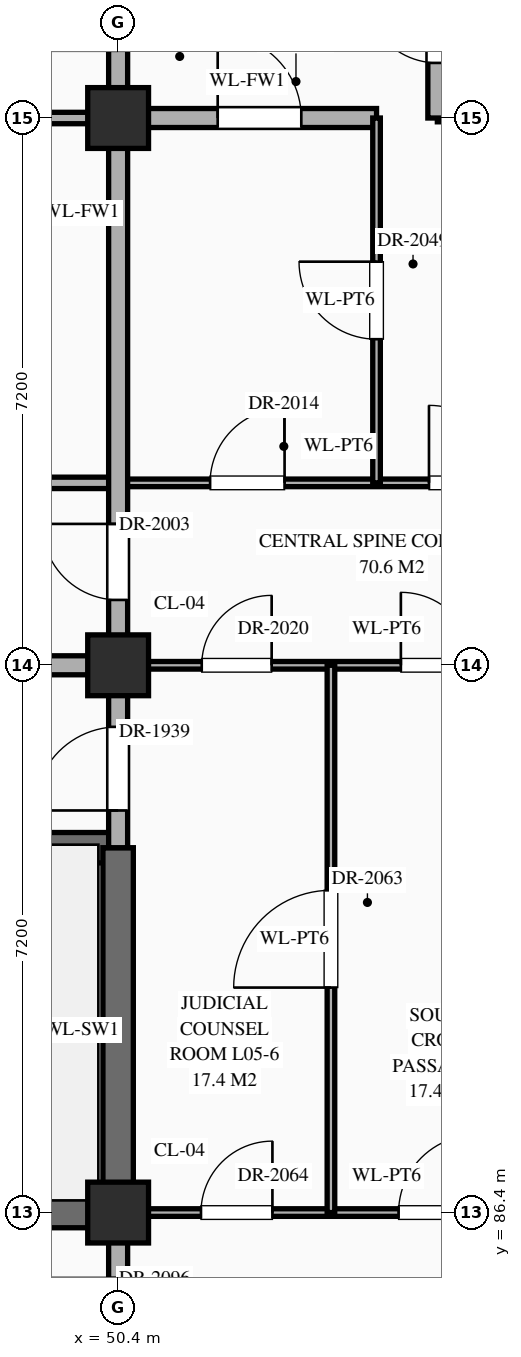
"""IFC4 building model, lengths in metres.
Left out: names, types, materials, properties, quantities, classifications, styles, units other than length and angle.
Written with IfcOpenShell. Run it as: python <this file> out.ifc"""

import sys

from ifc_helpers import new_model, si_unit, direction, frame, frame_2d, origin, origin_2d, place, context, subcontext, project, spatial, rectangle, extrude, element, fill, save


model = new_model("IFC4")
c1 = context("Model", 3, precision=1e-05, world=origin(), true_north=direction((0.0, 1.0)))
c2 = subcontext(c1, "Body", "Model", "MODEL_VIEW")
j1 = project(units=[si_unit("LENGTHUNIT", "METRE"), si_unit("PLANEANGLEUNIT", "RADIAN")], contexts=[c1])
p1 = place(None, origin())
s1 = spatial("IfcSite", under=j1, at=p1, CompositionType="ELEMENT")
p2 = place(p1, origin())
s2 = spatial("IfcBuilding", under=s1, at=p2, CompositionType="ELEMENT")
p3 = place(p2, frame((0.0, 0.0, 21.6)))
s3 = spatial("IfcBuildingStorey", under=s2, at=p3, CompositionType="ELEMENT", Elevation=21.6)
for number, where, z_axis, x_axis in (
    (1, (50.4, 86.4, 0.0), (0.0, 0.0, 1.0), (1.0, 0.0, 0.0)),
    (2, (50.4, 93.6, 0.0), (0.0, 0.0, 1.0), (1.0, 0.0, 0.0)),
    (3, (50.4, 100.8, 0.0), (0.0, 0.0, 1.0), (1.0, 0.0, 0.0)),
):
    element("IfcColumn", number, at=place(p3, frame(where, z_axis=z_axis, x_axis=x_axis)), inside=s3, PredefinedType="COLUMN", context=c2, shape_type="SweptSolid", body=[
        extrude(rectangle(XDim=0.8, YDim=0.8, at=origin_2d()), origin(), (0.0, 0.0, 1.0), 4.5),
    ])
p4 = place(p3, frame((42.0, 86.4, 0.0), z_axis=(0.0, 0.0, 1.0), x_axis=(1.0, 0.0, 0.0)))
e4 = element("IfcWall", 4, at=p4, inside=s3, PredefinedType="SHEAR", context=c2, shape_type="SweptSolid", body=[
    extrude(rectangle(XDim=8.4, YDim=0.4, at=frame_2d((4.2, 0.0))), origin(), (0.0, 0.0, 1.0), 4.24),
])
p5 = place(p3, frame((50.4, 86.4, 0.0), z_axis=(0.0, 0.0, 1.0), x_axis=(1.0, 0.0, 0.0)))
e5 = element("IfcWall", 5, at=p5, inside=s3, PredefinedType="STANDARD", context=c2, shape_type="SweptSolid", body=[
    extrude(rectangle(XDim=8.4, YDim=0.1, at=frame_2d((4.2, 0.0))), origin(), (0.0, 0.0, 1.0), 3.39),
])
p6 = place(p5, frame((1.09, 0.0, 0.0)))
e6 = element("IfcOpeningElement", 6, at=p6, cuts=e5, PredefinedType="OPENING", context=c2, shape_type="SweptSolid", body=[
    extrude(rectangle(XDim=0.94, YDim=2.3, at=frame_2d((0.47, 1.15))), frame((0.0, 0.062, 0.0), z_axis=(0.0, -1.0, 0.0), x_axis=(1.0, 0.0, 0.0)), (0.0, 0.0, 1.0), 0.124),
])
p7 = place(p5, frame((3.69, 0.0, 0.0)))
e7 = element("IfcOpeningElement", 7, at=p7, cuts=e5, PredefinedType="OPENING", context=c2, shape_type="SweptSolid", body=[
    extrude(rectangle(XDim=1.02, YDim=2.4, at=frame_2d((0.51, 1.2))), frame((0.0, 0.062, 0.0), z_axis=(0.0, -1.0, 0.0), x_axis=(1.0, 0.0, 0.0)), (0.0, 0.0, 1.0), 0.124),
])
p8 = place(p5, frame((6.31, 0.0, 0.0)))
e8 = element("IfcOpeningElement", 8, at=p8, cuts=e5, PredefinedType="OPENING", context=c2, shape_type="SweptSolid", body=[
    extrude(rectangle(XDim=1.06, YDim=2.4, at=frame_2d((0.53, 1.2))), frame((0.0, 0.062, 0.0), z_axis=(0.0, -1.0, 0.0), x_axis=(1.0, 0.0, 0.0)), (0.0, 0.0, 1.0), 0.124),
])
p9 = place(p3, frame((42.0, 91.2, 0.0), z_axis=(0.0, 0.0, 1.0), x_axis=(1.0, 0.0, 0.0)))
e9 = element("IfcWall", 9, at=p9, inside=s3, PredefinedType="SHEAR", context=c2, shape_type="SweptSolid", body=[
    extrude(rectangle(XDim=8.4, YDim=0.4, at=frame_2d((4.2, 0.0))), origin(), (0.0, 0.0, 1.0), 4.24),
])
p10 = place(p9, frame((0.65, 0.0, 0.0)))
e10 = element("IfcOpeningElement", 10, at=p10, cuts=e9, PredefinedType="OPENING", context=c2, shape_type="SweptSolid", body=[
    extrude(rectangle(XDim=1.1, YDim=2.2, at=frame_2d((0.55, 1.1))), frame((0.0, 0.212, 0.0), z_axis=(0.0, -1.0, 0.0), x_axis=(1.0, 0.0, 0.0)), (0.0, 0.0, 1.0), 0.424),
])
p11 = place(p3, frame((42.0, 93.6, 0.0), z_axis=(0.0, 0.0, 1.0), x_axis=(1.0, 0.0, 0.0)))
e11 = element("IfcWall", 11, at=p11, inside=s3, PredefinedType="STANDARD", context=c2, shape_type="SweptSolid", body=[
    extrude(rectangle(XDim=8.4, YDim=0.25, at=frame_2d((4.2, 0.0))), origin(), (0.0, 0.0, 1.0), 3.39),
])
p12 = place(p11, frame((3.45, 0.0, 0.0)))
e12 = element("IfcOpeningElement", 12, at=p12, cuts=e11, PredefinedType="OPENING", context=c2, shape_type="SweptSolid", body=[
    extrude(rectangle(XDim=1.5, YDim=2.25, at=frame_2d((0.75, 1.125))), frame((0.0, 0.137, 0.0), z_axis=(0.0, -1.0, 0.0), x_axis=(1.0, 0.0, 0.0)), (0.0, 0.0, 1.0), 0.274),
])
p13 = place(p3, frame((50.4, 93.6, 0.0), z_axis=(0.0, 0.0, 1.0), x_axis=(1.0, 0.0, 0.0)))
e13 = element("IfcWall", 13, at=p13, inside=s3, PredefinedType="STANDARD", context=c2, shape_type="SweptSolid", body=[
    extrude(rectangle(XDim=8.4, YDim=0.1, at=frame_2d((4.2, 0.0))), origin(), (0.0, 0.0, 1.0), 3.39),
])
p14 = place(p13, frame((1.1, 0.0, 0.0)))
e14 = element("IfcOpeningElement", 14, at=p14, cuts=e13, PredefinedType="OPENING", context=c2, shape_type="SweptSolid", body=[
    extrude(rectangle(XDim=0.92, YDim=2.15, at=frame_2d((0.46, 1.075))), frame((0.0, 0.062, 0.0), z_axis=(0.0, -1.0, 0.0), x_axis=(1.0, 0.0, 0.0)), (0.0, 0.0, 1.0), 0.124),
])
p15 = place(p13, frame((3.72, 0.0, 0.0)))
e15 = element("IfcOpeningElement", 15, at=p15, cuts=e13, PredefinedType="OPENING", context=c2, shape_type="SweptSolid", body=[
    extrude(rectangle(XDim=0.96, YDim=2.2, at=frame_2d((0.48, 1.1))), frame((0.0, 0.062, 0.0), z_axis=(0.0, -1.0, 0.0), x_axis=(1.0, 0.0, 0.0)), (0.0, 0.0, 1.0), 0.124),
])
p16 = place(p13, frame((6.34, 0.0, 0.0)))
e16 = element("IfcOpeningElement", 16, at=p16, cuts=e13, PredefinedType="OPENING", context=c2, shape_type="SweptSolid", body=[
    extrude(rectangle(XDim=1.0, YDim=2.25, at=frame_2d((0.5, 1.125))), frame((0.0, 0.062, 0.0), z_axis=(0.0, -1.0, 0.0), x_axis=(1.0, 0.0, 0.0)), (0.0, 0.0, 1.0), 0.124),
])
p17 = place(p3, frame((31.0, 96.0, 0.0), z_axis=(0.0, 0.0, 1.0), x_axis=(1.0, 0.0, 0.0)))
e17 = element("IfcWall", 17, at=p17, inside=s3, PredefinedType="STANDARD", context=c2, shape_type="SweptSolid", body=[
    extrude(rectangle(XDim=19.4, YDim=0.15, at=frame_2d((9.7, 0.0))), origin(), (0.0, 0.0, 1.0), 4.24),
])
p18 = place(p17, frame((0.78, 0.0, 0.0)))
e18 = element("IfcOpeningElement", 18, at=p18, cuts=e17, PredefinedType="OPENING", context=c2, shape_type="SweptSolid", body=[
    extrude(rectangle(XDim=1.04, YDim=2.2, at=frame_2d((0.52, 1.1))), frame((0.0, 0.087, 0.0), z_axis=(0.0, -1.0, 0.0), x_axis=(1.0, 0.0, 0.0)), (0.0, 0.0, 1.0), 0.174),
])
p19 = place(p17, frame((6.26, 0.0, 0.0)))
e19 = element("IfcOpeningElement", 19, at=p19, cuts=e17, PredefinedType="OPENING", context=c2, shape_type="SweptSolid", body=[
    extrude(rectangle(XDim=1.08, YDim=2.25, at=frame_2d((0.54, 1.125))), frame((0.0, 0.087, 0.0), z_axis=(0.0, -1.0, 0.0), x_axis=(1.0, 0.0, 0.0)), (0.0, 0.0, 1.0), 0.174),
])
p20 = place(p17, frame((14.64, 0.0, 0.0)))
e20 = element("IfcOpeningElement", 20, at=p20, cuts=e17, PredefinedType="OPENING", context=c2, shape_type="SweptSolid", body=[
    extrude(rectangle(XDim=1.12, YDim=2.25, at=frame_2d((0.56, 1.125))), frame((0.0, 0.087, 0.0), z_axis=(0.0, -1.0, 0.0), x_axis=(1.0, 0.0, 0.0)), (0.0, 0.0, 1.0), 0.174),
])
p21 = place(p3, frame((50.4, 96.0, 0.0), z_axis=(0.0, 0.0, 1.0), x_axis=(1.0, 0.0, 0.0)))
e21 = element("IfcWall", 21, at=p21, inside=s3, PredefinedType="STANDARD", context=c2, shape_type="SweptSolid", body=[
    extrude(rectangle(XDim=5.8, YDim=0.1, at=frame_2d((2.9, 0.0))), origin(), (0.0, 0.0, 1.0), 4.24),
])
p22 = place(p21, frame((1.21, 0.0, 0.0)))
e22 = element("IfcOpeningElement", 22, at=p22, cuts=e21, PredefinedType="OPENING", context=c2, shape_type="SweptSolid", body=[
    extrude(rectangle(XDim=0.98, YDim=2.35, at=frame_2d((0.49, 1.175))), frame((0.0, 0.062, 0.0), z_axis=(0.0, -1.0, 0.0), x_axis=(1.0, 0.0, 0.0)), (0.0, 0.0, 1.0), 0.124),
])
p23 = place(p21, frame((4.09, 0.0, 0.0)))
e23 = element("IfcOpeningElement", 23, at=p23, cuts=e21, PredefinedType="OPENING", context=c2, shape_type="SweptSolid", body=[
    extrude(rectangle(XDim=1.02, YDim=2.4, at=frame_2d((0.51, 1.2))), frame((0.0, 0.062, 0.0), z_axis=(0.0, -1.0, 0.0), x_axis=(1.0, 0.0, 0.0)), (0.0, 0.0, 1.0), 0.124),
])
p24 = place(p3, frame((46.2, 100.8, 0.0), z_axis=(0.0, 0.0, 1.0), x_axis=(1.0, 0.0, 0.0)))
e24 = element("IfcWall", 24, at=p24, inside=s3, PredefinedType="STANDARD", context=c2, shape_type="SweptSolid", body=[
    extrude(rectangle(XDim=4.2, YDim=0.15, at=frame_2d((2.1, 0.0))), origin(), (0.0, 0.0, 1.0), 3.39),
])
p25 = place(p24, frame((1.38, 0.0, 0.0)))
e25 = element("IfcOpeningElement", 25, at=p25, cuts=e24, PredefinedType="OPENING", context=c2, shape_type="SweptSolid", body=[
    extrude(rectangle(XDim=1.12, YDim=2.25, at=frame_2d((0.56, 1.125))), frame((0.0, 0.087, 0.0), z_axis=(0.0, -1.0, 0.0), x_axis=(1.0, 0.0, 0.0)), (0.0, 0.0, 1.0), 0.174),
])
p26 = place(p3, frame((50.4, 100.8, 0.0), z_axis=(0.0, 0.0, 1.0), x_axis=(1.0, 0.0, 0.0)))
e26 = element("IfcWall", 26, at=p26, inside=s3, PredefinedType="STANDARD", context=c2, shape_type="SweptSolid", body=[
    extrude(rectangle(XDim=3.4, YDim=0.25, at=frame_2d((1.7, 0.0))), origin(), (0.0, 0.0, 1.0), 3.39),
])
p27 = place(p26, frame((1.31, 0.0, 0.0)))
e27 = element("IfcOpeningElement", 27, at=p27, cuts=e26, PredefinedType="OPENING", context=c2, shape_type="SweptSolid", body=[
    extrude(rectangle(XDim=1.1, YDim=2.2, at=frame_2d((0.55, 1.1))), frame((0.0, 0.137, 0.0), z_axis=(0.0, -1.0, 0.0), x_axis=(1.0, 0.0, 0.0)), (0.0, 0.0, 1.0), 0.274),
])
p28 = place(p3, frame((54.6, 100.8, 0.0), z_axis=(0.0, 0.0, 1.0), x_axis=(1.0, 0.0, 0.0)))
e28 = element("IfcWall", 28, at=p28, inside=s3, PredefinedType="STANDARD", context=c2, shape_type="SweptSolid", body=[
    extrude(rectangle(XDim=1.6, YDim=0.1, at=frame_2d((0.8, 0.0))), origin(), (0.0, 0.0, 1.0), 3.39),
])
p29 = place(p28, frame((0.18, 0.0, 0.0)))
e29 = element("IfcOpeningElement", 29, at=p29, cuts=e28, PredefinedType="OPENING", context=c2, shape_type="SweptSolid", body=[
    extrude(rectangle(XDim=1.24, YDim=2.3, at=frame_2d((0.62, 1.15))), frame((0.0, 0.062, 0.0), z_axis=(0.0, -1.0, 0.0), x_axis=(1.0, 0.0, 0.0)), (0.0, 0.0, 1.0), 0.124),
])
p30 = place(p3, frame((50.4, 79.24, 0.0), z_axis=(0.0, 0.0, 1.0), x_axis=(0.0, 1.0, 0.0)))
e30 = element("IfcWall", 30, at=p30, inside=s3, PredefinedType="STANDARD", context=c2, shape_type="SweptSolid", body=[
    extrude(rectangle(XDim=7.16, YDim=0.25, at=frame_2d((3.58, 0.0))), origin(), (0.0, 0.0, 1.0), 3.49),
])
p31 = place(p30, frame((5.3, 0.0, 0.0)))
e31 = element("IfcOpeningElement", 31, at=p31, cuts=e30, PredefinedType="OPENING", context=c2, shape_type="SweptSolid", body=[
    extrude(rectangle(XDim=1.0, YDim=2.2, at=frame_2d((0.5, 1.1))), frame((0.0, 0.137, 0.0), z_axis=(0.0, -1.0, 0.0), x_axis=(1.0, 0.0, 0.0)), (0.0, 0.0, 1.0), 0.274),
])
p32 = place(p3, frame((50.4, 86.4, 0.0), z_axis=(0.0, 0.0, 1.0), x_axis=(0.0, 1.0, 0.0)))
e32 = element("IfcWall", 32, at=p32, inside=s3, PredefinedType="SHEAR", context=c2, shape_type="SweptSolid", body=[
    extrude(rectangle(XDim=4.8, YDim=0.4, at=frame_2d((2.4, 0.0))), origin(), (0.0, 0.0, 1.0), 4.24),
])
p33 = place(p3, frame((50.4, 91.2, 0.0), z_axis=(0.0, 0.0, 1.0), x_axis=(0.0, 1.0, 0.0)))
e33 = element("IfcWall", 33, at=p33, inside=s3, PredefinedType="STANDARD", context=c2, shape_type="SweptSolid", body=[
    extrude(rectangle(XDim=13.2, YDim=0.25, at=frame_2d((6.6, 0.0))), origin(), (0.0, 0.0, 1.0), 3.49),
])
p34 = place(p33, frame((0.49, 0.0, 0.0)))
e34 = element("IfcOpeningElement", 34, at=p34, cuts=e33, PredefinedType="OPENING", context=c2, shape_type="SweptSolid", body=[
    extrude(rectangle(XDim=1.1, YDim=2.2, at=frame_2d((0.55, 1.1))), frame((0.0, 0.137, 0.0), z_axis=(0.0, -1.0, 0.0), x_axis=(1.0, 0.0, 0.0)), (0.0, 0.0, 1.0), 0.274),
])
p35 = place(p33, frame((10.485, 0.0, 0.0)))
e35 = element("IfcOpeningElement", 35, at=p35, cuts=e33, PredefinedType="OPENING", context=c2, shape_type="SweptSolid", body=[
    extrude(rectangle(XDim=0.95, YDim=2.15, at=frame_2d((0.475, 1.075))), frame((0.0, 0.137, 0.0), z_axis=(0.0, -1.0, 0.0), x_axis=(1.0, 0.0, 0.0)), (0.0, 0.0, 1.0), 0.274),
])
p36 = place(p33, frame((3.26, 0.0, 0.0)))
e36 = element("IfcOpeningElement", 36, at=p36, cuts=e33, PredefinedType="OPENING", context=c2, shape_type="SweptSolid", body=[
    extrude(rectangle(XDim=1.0, YDim=2.2, at=frame_2d((0.5, 1.1))), frame((0.0, 0.137, 0.0), z_axis=(0.0, -1.0, 0.0), x_axis=(1.0, 0.0, 0.0)), (0.0, 0.0, 1.0), 0.274),
])
p37 = place(p3, frame((53.2, 86.4, 0.0), z_axis=(0.0, 0.0, 1.0), x_axis=(0.0, 1.0, 0.0)))
e37 = element("IfcWall", 37, at=p37, inside=s3, PredefinedType="STANDARD", context=c2, shape_type="SweptSolid", body=[
    extrude(rectangle(XDim=7.2, YDim=0.1, at=frame_2d((3.6, 0.0))), origin(), (0.0, 0.0, 1.0), 4.24),
])
p38 = place(p37, frame((2.96, 0.0, 0.0)))
e38 = element("IfcOpeningElement", 38, at=p38, cuts=e37, PredefinedType="OPENING", context=c2, shape_type="SweptSolid", body=[
    extrude(rectangle(XDim=1.28, YDim=2.35, at=frame_2d((0.64, 1.175))), frame((0.0, 0.062, 0.0), z_axis=(0.0, -1.0, 0.0), x_axis=(1.0, 0.0, 0.0)), (0.0, 0.0, 1.0), 0.124),
])
p39 = place(p3, frame((53.8, 96.0, 0.0), z_axis=(0.0, 0.0, 1.0), x_axis=(0.0, 1.0, 0.0)))
e39 = element("IfcWall", 39, at=p39, inside=s3, PredefinedType="STANDARD", context=c2, shape_type="SweptSolid", body=[
    extrude(rectangle(XDim=4.8, YDim=0.1, at=frame_2d((2.4, 0.0))), origin(), (0.0, 0.0, 1.0), 4.24),
])
p40 = place(p39, frame((1.89, 0.0, 0.0)))
e40 = element("IfcOpeningElement", 40, at=p40, cuts=e39, PredefinedType="OPENING", context=c2, shape_type="SweptSolid", body=[
    extrude(rectangle(XDim=1.02, YDim=2.4, at=frame_2d((0.51, 1.2))), frame((0.0, 0.062, 0.0), z_axis=(0.0, -1.0, 0.0), x_axis=(1.0, 0.0, 0.0)), (0.0, 0.0, 1.0), 0.124),
])
p41 = place(p3, frame((54.6, 100.8, 0.0), z_axis=(0.0, 0.0, 1.0), x_axis=(0.0, 1.0, 0.0)))
e41 = element("IfcWall", 41, at=p41, inside=s3, PredefinedType="STANDARD", context=c2, shape_type="SweptSolid", body=[
    extrude(rectangle(XDim=3.6, YDim=0.25, at=frame_2d((1.8, 0.0))), origin(), (0.0, 0.0, 1.0), 3.94),
])
p42 = place(p41, frame((0.725, 0.0, 0.0)))
e42 = element("IfcOpeningElement", 42, at=p42, cuts=e41, PredefinedType="OPENING", context=c2, shape_type="SweptSolid", body=[
    extrude(rectangle(XDim=0.95, YDim=2.15, at=frame_2d((0.475, 1.075))), frame((0.0, 0.137, 0.0), z_axis=(0.0, -1.0, 0.0), x_axis=(1.0, 0.0, 0.0)), (0.0, 0.0, 1.0), 0.274),
])
p43 = place(p34, origin())
e43 = element("IfcDoor", 43, at=p43, inside=s3, OperationType="SINGLE_SWING_LEFT", PredefinedType="DOOR", context=c2, shape_type="SweptSolid", body=[
    extrude(rectangle(XDim=1.1, YDim=2.2, at=frame_2d((0.55, 1.1))), frame((0.0, 0.025, 0.0), z_axis=(0.0, -1.0, 0.0), x_axis=(1.0, 0.0, 0.0)), (0.0, 0.0, 1.0), 0.05),
])
fill(e34, e43)
p44 = place(p42, origin())
e44 = element("IfcDoor", 44, at=p44, inside=s3, OperationType="SINGLE_SWING_RIGHT", PredefinedType="DOOR", context=c2, shape_type="SweptSolid", body=[
    extrude(rectangle(XDim=0.95, YDim=2.15, at=frame_2d((0.475, 1.075))), frame((0.0, 0.025, 0.0), z_axis=(0.0, -1.0, 0.0), x_axis=(1.0, 0.0, 0.0)), (0.0, 0.0, 1.0), 0.05),
])
fill(e42, e44)
p45 = place(p27, origin())
e45 = element("IfcDoor", 45, at=p45, inside=s3, OperationType="SINGLE_SWING_LEFT", PredefinedType="DOOR", context=c2, shape_type="SweptSolid", body=[
    extrude(rectangle(XDim=1.1, YDim=2.2, at=frame_2d((0.55, 1.1))), frame((0.0, 0.025, 0.0), z_axis=(0.0, -1.0, 0.0), x_axis=(1.0, 0.0, 0.0)), (0.0, 0.0, 1.0), 0.05),
])
fill(e27, e45)
p46 = place(p36, origin())
e46 = element("IfcDoor", 46, at=p46, inside=s3, OperationType="SINGLE_SWING_RIGHT", PredefinedType="DOOR", context=c2, shape_type="SweptSolid", body=[
    extrude(rectangle(XDim=1.0, YDim=2.2, at=frame_2d((0.5, 1.1))), frame((0.0, 0.025, 0.0), z_axis=(0.0, -1.0, 0.0), x_axis=(1.0, 0.0, 0.0)), (0.0, 0.0, 1.0), 0.05),
])
fill(e36, e46)
p47 = place(p22, origin())
e47 = element("IfcDoor", 47, at=p47, inside=s3, OperationType="SINGLE_SWING_RIGHT", PredefinedType="DOOR", context=c2, shape_type="SweptSolid", body=[
    extrude(rectangle(XDim=0.98, YDim=2.35, at=frame_2d((0.49, 1.175))), frame((0.0, 0.025, 0.0), z_axis=(0.0, -1.0, 0.0), x_axis=(1.0, 0.0, 0.0)), (0.0, 0.0, 1.0), 0.05),
])
fill(e22, e47)
p48 = place(p23, origin())
e48 = element("IfcDoor", 48, at=p48, inside=s3, OperationType="SINGLE_SWING_LEFT", PredefinedType="DOOR", context=c2, shape_type="SweptSolid", body=[
    extrude(rectangle(XDim=1.02, YDim=2.4, at=frame_2d((0.51, 1.2))), frame((0.0, 0.025, 0.0), z_axis=(0.0, -1.0, 0.0), x_axis=(1.0, 0.0, 0.0)), (0.0, 0.0, 1.0), 0.05),
])
fill(e23, e48)
p49 = place(p14, origin())
e49 = element("IfcDoor", 49, at=p49, inside=s3, OperationType="SINGLE_SWING_RIGHT", PredefinedType="DOOR", context=c2, shape_type="SweptSolid", body=[
    extrude(rectangle(XDim=0.92, YDim=2.15, at=frame_2d((0.46, 1.075))), frame((0.0, 0.025, 0.0), z_axis=(0.0, -1.0, 0.0), x_axis=(1.0, 0.0, 0.0)), (0.0, 0.0, 1.0), 0.05),
])
fill(e14, e49)
p50 = place(p15, origin())
e50 = element("IfcDoor", 50, at=p50, inside=s3, OperationType="SINGLE_SWING_LEFT", PredefinedType="DOOR", context=c2, shape_type="SweptSolid", body=[
    extrude(rectangle(XDim=0.96, YDim=2.2, at=frame_2d((0.48, 1.1))), frame((0.0, 0.025, 0.0), z_axis=(0.0, -1.0, 0.0), x_axis=(1.0, 0.0, 0.0)), (0.0, 0.0, 1.0), 0.05),
])
fill(e15, e50)
p51 = place(p40, origin())
e51 = element("IfcDoor", 51, at=p51, inside=s3, OperationType="SINGLE_SWING_RIGHT", PredefinedType="DOOR", context=c2, shape_type="SweptSolid", body=[
    extrude(rectangle(XDim=1.02, YDim=2.4, at=frame_2d((0.51, 1.2))), frame((0.0, 0.025, 0.0), z_axis=(0.0, -1.0, 0.0), x_axis=(1.0, 0.0, 0.0)), (0.0, 0.0, 1.0), 0.05),
])
fill(e40, e51)
p52 = place(p38, origin())
e52 = element("IfcDoor", 52, at=p52, inside=s3, OperationType="SINGLE_SWING_LEFT", PredefinedType="DOOR", context=c2, shape_type="SweptSolid", body=[
    extrude(rectangle(XDim=1.28, YDim=2.35, at=frame_2d((0.64, 1.175))), frame((0.0, 0.025, 0.0), z_axis=(0.0, -1.0, 0.0), x_axis=(1.0, 0.0, 0.0)), (0.0, 0.0, 1.0), 0.05),
])
fill(e38, e52)
p53 = place(p6, origin())
e53 = element("IfcDoor", 53, at=p53, inside=s3, OperationType="SINGLE_SWING_RIGHT", PredefinedType="DOOR", context=c2, shape_type="SweptSolid", body=[
    extrude(rectangle(XDim=0.94, YDim=2.3, at=frame_2d((0.47, 1.15))), frame((0.0, 0.025, 0.0), z_axis=(0.0, -1.0, 0.0), x_axis=(1.0, 0.0, 0.0)), (0.0, 0.0, 1.0), 0.05),
])
fill(e6, e53)
p54 = place(p7, origin())
e54 = element("IfcDoor", 54, at=p54, inside=s3, OperationType="SINGLE_SWING_RIGHT", PredefinedType="DOOR", context=c2, shape_type="SweptSolid", body=[
    extrude(rectangle(XDim=1.02, YDim=2.4, at=frame_2d((0.51, 1.2))), frame((0.0, 0.025, 0.0), z_axis=(0.0, -1.0, 0.0), x_axis=(1.0, 0.0, 0.0)), (0.0, 0.0, 1.0), 0.05),
])
fill(e7, e54)
save(model, sys.argv[1])
